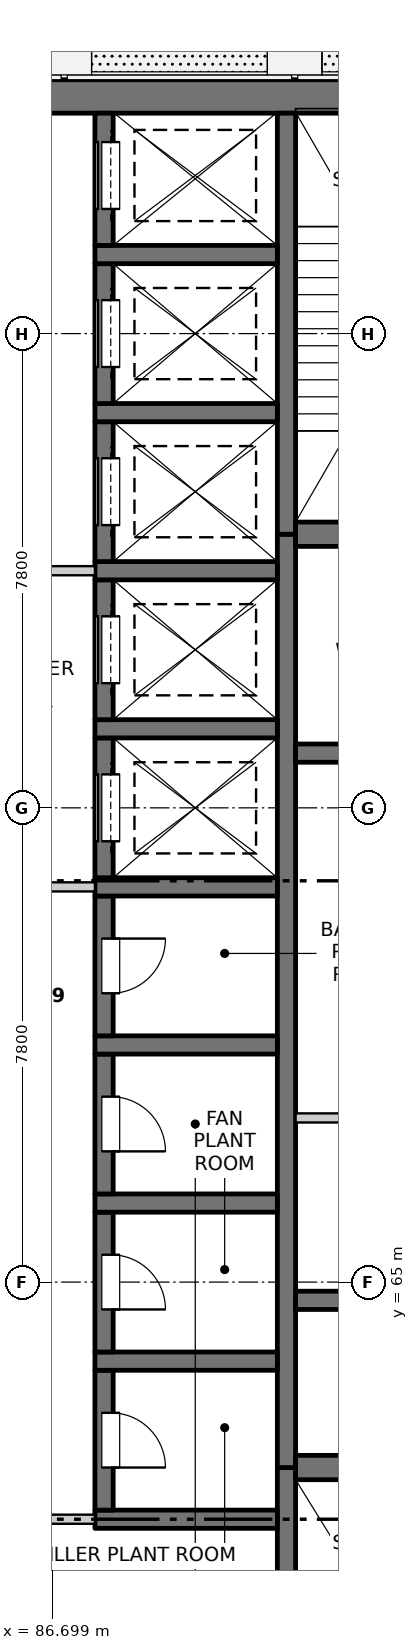
"""IFC4 building model, lengths in metres.
Left out: names, types, materials, properties, quantities, classifications, styles, units other than length and angle.
Written with IfcOpenShell. Run it as: python <this file> out.ifc"""

import sys

from ifc_helpers import new_model, si_unit, direction, frame, frame_2d, origin, place, context, subcontext, project, spatial, rectangle, extrude, element, fill, save


model = new_model("IFC4")
c1 = context("Model", 3, precision=1e-05, world=origin(), true_north=direction((0.0, 1.0)))
c2 = subcontext(c1, "Body", "Model", "MODEL_VIEW")
j1 = project(units=[si_unit("LENGTHUNIT", "METRE"), si_unit("PLANEANGLEUNIT", "RADIAN")], contexts=[c1])
p1 = place(None, origin())
s1 = spatial("IfcSite", under=j1, at=p1, CompositionType="ELEMENT")
p2 = place(p1, origin())
s2 = spatial("IfcBuilding", under=s1, at=p2, CompositionType="ELEMENT")
p3 = place(p2, frame((0.0, 0.0, 192.8)))
s3 = spatial("IfcBuildingStorey", under=s2, at=p3, CompositionType="ELEMENT", Elevation=192.8)
p4 = place(p3, frame((75.525, 84.5, -0.3), z_axis=(0.0, 0.0, 1.0), x_axis=(1.0, 0.0, 0.0)))
e1 = element("IfcWall", 1, at=p4, inside=s3, PredefinedType="SOLIDWALL", context=c2, shape_type="SweptSolid", body=[
    extrude(rectangle(XDim=18.95, YDim=0.55, at=frame_2d((9.475, 0.0))), origin(), (0.0, 0.0, 1.0), 4.5),
])
p5 = place(p3, frame((90.55, 55.525, -0.3), z_axis=(0.0, 0.0, 1.0), x_axis=(0.0, 1.0, 0.0)))
e2 = element("IfcWall", 2, at=p5, inside=s3, PredefinedType="SOLIDWALL", context=c2, shape_type="SweptSolid", body=[
    extrude(rectangle(XDim=6.425, YDim=0.3, at=frame_2d((3.212, 0.0))), origin(), (0.0, 0.0, 1.0), 4.5),
])
p6 = place(p5, frame((0.125, 0.0, 0.3)))
e3 = element("IfcOpeningElement", 3, at=p6, cuts=e2, PredefinedType="OPENING", context=c2, shape_type="SweptSolid", body=[
    extrude(rectangle(XDim=1.2, YDim=2.1, at=frame_2d((0.6, 1.05))), frame((0.0, 0.16, 0.0), z_axis=(0.0, -1.0, 0.0), x_axis=(1.0, 0.0, 0.0)), (0.0, 0.0, 1.0), 0.32),
])
p7 = place(p3, frame((90.55, 61.95, -0.3), z_axis=(0.0, 0.0, 1.0), x_axis=(0.0, 1.0, 0.0)))
e4 = element("IfcWall", 4, at=p7, inside=s3, PredefinedType="SOLIDWALL", context=c2, shape_type="SweptSolid", body=[
    extrude(rectangle(XDim=15.35, YDim=0.3, at=frame_2d((7.675, 0.0))), origin(), (0.0, 0.0, 1.0), 4.5),
])
p8 = place(p3, frame((90.55, 77.3, -0.3), z_axis=(0.0, 0.0, 1.0), x_axis=(0.0, 1.0, 0.0)))
e5 = element("IfcWall", 5, at=p8, inside=s3, PredefinedType="SOLIDWALL", context=c2, shape_type="SweptSolid", body=[
    extrude(rectangle(XDim=6.925, YDim=0.3, at=frame_2d((3.462, 0.0))), origin(), (0.0, 0.0, 1.0), 4.5),
])
p9 = place(p3, frame((87.4, 61.1, -0.3), z_axis=(0.0, 0.0, 1.0), x_axis=(1.0, 0.0, 0.0)))
e6 = element("IfcWall", 6, at=p9, inside=s3, PredefinedType="SOLIDWALL", context=c2, shape_type="SweptSolid", body=[
    extrude(rectangle(XDim=3.0, YDim=0.3, at=frame_2d((1.5, 0.0))), origin(), (0.0, 0.0, 1.0), 4.5),
])
p10 = place(p3, frame((87.55, 61.25, -0.3), z_axis=(0.0, 0.0, 1.0), x_axis=(0.0, 1.0, 0.0)))
e7 = element("IfcWall", 7, at=p10, inside=s3, PredefinedType="SOLIDWALL", context=c2, shape_type="SweptSolid", body=[
    extrude(rectangle(XDim=2.3, YDim=0.3, at=frame_2d((1.15, 0.0))), origin(), (0.0, 0.0, 1.0), 4.5),
])
p11 = place(p10, frame((0.7, 0.0, 0.3)))
e8 = element("IfcOpeningElement", 8, at=p11, cuts=e7, PredefinedType="OPENING", context=c2, shape_type="SweptSolid", body=[
    extrude(rectangle(XDim=0.9, YDim=2.1, at=frame_2d((0.45, 1.05))), frame((0.0, 0.16, 0.0), z_axis=(0.0, -1.0, 0.0), x_axis=(1.0, 0.0, 0.0)), (0.0, 0.0, 1.0), 0.32),
])
p12 = place(p3, frame((87.4, 63.7, -0.3), z_axis=(0.0, 0.0, 1.0), x_axis=(1.0, 0.0, 0.0)))
e9 = element("IfcWall", 9, at=p12, inside=s3, PredefinedType="SOLIDWALL", context=c2, shape_type="SweptSolid", body=[
    extrude(rectangle(XDim=3.0, YDim=0.3, at=frame_2d((1.5, 0.0))), origin(), (0.0, 0.0, 1.0), 4.5),
])
p13 = place(p3, frame((87.55, 63.85, -0.3), z_axis=(0.0, 0.0, 1.0), x_axis=(0.0, 1.0, 0.0)))
e10 = element("IfcWall", 10, at=p13, inside=s3, PredefinedType="SOLIDWALL", context=c2, shape_type="SweptSolid", body=[
    extrude(rectangle(XDim=2.3, YDim=0.3, at=frame_2d((1.15, 0.0))), origin(), (0.0, 0.0, 1.0), 4.5),
])
p14 = place(p13, frame((0.7, 0.0, 0.3)))
e11 = element("IfcOpeningElement", 11, at=p14, cuts=e10, PredefinedType="OPENING", context=c2, shape_type="SweptSolid", body=[
    extrude(rectangle(XDim=0.9, YDim=2.1, at=frame_2d((0.45, 1.05))), frame((0.0, 0.16, 0.0), z_axis=(0.0, -1.0, 0.0), x_axis=(1.0, 0.0, 0.0)), (0.0, 0.0, 1.0), 0.32),
])
p15 = place(p3, frame((87.4, 66.3, -0.3), z_axis=(0.0, 0.0, 1.0), x_axis=(1.0, 0.0, 0.0)))
e12 = element("IfcWall", 12, at=p15, inside=s3, PredefinedType="SOLIDWALL", context=c2, shape_type="SweptSolid", body=[
    extrude(rectangle(XDim=3.0, YDim=0.3, at=frame_2d((1.5, 0.0))), origin(), (0.0, 0.0, 1.0), 4.5),
])
p16 = place(p3, frame((87.55, 66.45, -0.3), z_axis=(0.0, 0.0, 1.0), x_axis=(0.0, 1.0, 0.0)))
e13 = element("IfcWall", 13, at=p16, inside=s3, PredefinedType="SOLIDWALL", context=c2, shape_type="SweptSolid", body=[
    extrude(rectangle(XDim=2.3, YDim=0.3, at=frame_2d((1.15, 0.0))), origin(), (0.0, 0.0, 1.0), 4.5),
])
p17 = place(p16, frame((0.7, 0.0, 0.3)))
e14 = element("IfcOpeningElement", 14, at=p17, cuts=e13, PredefinedType="OPENING", context=c2, shape_type="SweptSolid", body=[
    extrude(rectangle(XDim=0.9, YDim=2.1, at=frame_2d((0.45, 1.05))), frame((0.0, 0.16, 0.0), z_axis=(0.0, -1.0, 0.0), x_axis=(1.0, 0.0, 0.0)), (0.0, 0.0, 1.0), 0.32),
])
p18 = place(p3, frame((87.4, 68.9, -0.3), z_axis=(0.0, 0.0, 1.0), x_axis=(1.0, 0.0, 0.0)))
e15 = element("IfcWall", 15, at=p18, inside=s3, PredefinedType="SOLIDWALL", context=c2, shape_type="SweptSolid", body=[
    extrude(rectangle(XDim=3.0, YDim=0.3, at=frame_2d((1.5, 0.0))), origin(), (0.0, 0.0, 1.0), 4.5),
])
p19 = place(p3, frame((87.55, 69.05, -0.3), z_axis=(0.0, 0.0, 1.0), x_axis=(0.0, 1.0, 0.0)))
e16 = element("IfcWall", 16, at=p19, inside=s3, PredefinedType="SOLIDWALL", context=c2, shape_type="SweptSolid", body=[
    extrude(rectangle(XDim=2.3, YDim=0.3, at=frame_2d((1.15, 0.0))), origin(), (0.0, 0.0, 1.0), 4.5),
])
p20 = place(p19, frame((0.7, 0.0, 0.3)))
e17 = element("IfcOpeningElement", 17, at=p20, cuts=e16, PredefinedType="OPENING", context=c2, shape_type="SweptSolid", body=[
    extrude(rectangle(XDim=0.9, YDim=2.1, at=frame_2d((0.45, 1.05))), frame((0.0, 0.16, 0.0), z_axis=(0.0, -1.0, 0.0), x_axis=(1.0, 0.0, 0.0)), (0.0, 0.0, 1.0), 0.32),
])
p21 = place(p3, frame((87.4, 71.5, -0.3), z_axis=(0.0, 0.0, 1.0), x_axis=(1.0, 0.0, 0.0)))
e18 = element("IfcWall", 18, at=p21, inside=s3, PredefinedType="SOLIDWALL", context=c2, shape_type="SweptSolid", body=[
    extrude(rectangle(XDim=3.0, YDim=0.3, at=frame_2d((1.5, 0.0))), origin(), (0.0, 0.0, 1.0), 4.5),
])
p22 = place(p3, frame((87.55, 71.65, -0.3), z_axis=(0.0, 0.0, 1.0), x_axis=(0.0, 1.0, 0.0)))
e19 = element("IfcWall", 19, at=p22, inside=s3, PredefinedType="SOLIDWALL", context=c2, shape_type="SweptSolid", body=[
    extrude(rectangle(XDim=2.3, YDim=0.3, at=frame_2d((1.15, 0.0))), origin(), (0.0, 0.0, 1.0), 4.5),
])
p23 = place(p22, frame((0.6, 0.0, 0.3)))
e20 = element("IfcOpeningElement", 20, at=p23, cuts=e19, PredefinedType="OPENING", context=c2, shape_type="SweptSolid", body=[
    extrude(rectangle(XDim=1.1, YDim=2.1, at=frame_2d((0.55, 1.05))), frame((0.0, 0.16, 0.0), z_axis=(0.0, -1.0, 0.0), x_axis=(1.0, 0.0, 0.0)), (0.0, 0.0, 1.0), 0.32),
])
p24 = place(p3, frame((87.4, 74.1, -0.3), z_axis=(0.0, 0.0, 1.0), x_axis=(1.0, 0.0, 0.0)))
e21 = element("IfcWall", 21, at=p24, inside=s3, PredefinedType="SOLIDWALL", context=c2, shape_type="SweptSolid", body=[
    extrude(rectangle(XDim=3.0, YDim=0.3, at=frame_2d((1.5, 0.0))), origin(), (0.0, 0.0, 1.0), 4.5),
])
p25 = place(p3, frame((87.55, 74.25, -0.3), z_axis=(0.0, 0.0, 1.0), x_axis=(0.0, 1.0, 0.0)))
e22 = element("IfcWall", 22, at=p25, inside=s3, PredefinedType="SOLIDWALL", context=c2, shape_type="SweptSolid", body=[
    extrude(rectangle(XDim=2.3, YDim=0.3, at=frame_2d((1.15, 0.0))), origin(), (0.0, 0.0, 1.0), 4.5),
])
p26 = place(p25, frame((0.6, 0.0, 0.3)))
e23 = element("IfcOpeningElement", 23, at=p26, cuts=e22, PredefinedType="OPENING", context=c2, shape_type="SweptSolid", body=[
    extrude(rectangle(XDim=1.1, YDim=2.1, at=frame_2d((0.55, 1.05))), frame((0.0, 0.16, 0.0), z_axis=(0.0, -1.0, 0.0), x_axis=(1.0, 0.0, 0.0)), (0.0, 0.0, 1.0), 0.32),
])
p27 = place(p3, frame((87.4, 76.7, -0.3), z_axis=(0.0, 0.0, 1.0), x_axis=(1.0, 0.0, 0.0)))
e24 = element("IfcWall", 24, at=p27, inside=s3, PredefinedType="SOLIDWALL", context=c2, shape_type="SweptSolid", body=[
    extrude(rectangle(XDim=3.0, YDim=0.3, at=frame_2d((1.5, 0.0))), origin(), (0.0, 0.0, 1.0), 4.5),
])
p28 = place(p3, frame((87.55, 76.85, -0.3), z_axis=(0.0, 0.0, 1.0), x_axis=(0.0, 1.0, 0.0)))
e25 = element("IfcWall", 25, at=p28, inside=s3, PredefinedType="SOLIDWALL", context=c2, shape_type="SweptSolid", body=[
    extrude(rectangle(XDim=2.3, YDim=0.3, at=frame_2d((1.15, 0.0))), origin(), (0.0, 0.0, 1.0), 4.5),
])
p29 = place(p28, frame((0.6, 0.0, 0.3)))
e26 = element("IfcOpeningElement", 26, at=p29, cuts=e25, PredefinedType="OPENING", context=c2, shape_type="SweptSolid", body=[
    extrude(rectangle(XDim=1.1, YDim=2.1, at=frame_2d((0.55, 1.05))), frame((0.0, 0.16, 0.0), z_axis=(0.0, -1.0, 0.0), x_axis=(1.0, 0.0, 0.0)), (0.0, 0.0, 1.0), 0.32),
])
p30 = place(p3, frame((87.4, 79.3, -0.3), z_axis=(0.0, 0.0, 1.0), x_axis=(1.0, 0.0, 0.0)))
e27 = element("IfcWall", 27, at=p30, inside=s3, PredefinedType="SOLIDWALL", context=c2, shape_type="SweptSolid", body=[
    extrude(rectangle(XDim=3.0, YDim=0.3, at=frame_2d((1.5, 0.0))), origin(), (0.0, 0.0, 1.0), 4.5),
])
p31 = place(p3, frame((87.55, 79.45, -0.3), z_axis=(0.0, 0.0, 1.0), x_axis=(0.0, 1.0, 0.0)))
e28 = element("IfcWall", 28, at=p31, inside=s3, PredefinedType="SOLIDWALL", context=c2, shape_type="SweptSolid", body=[
    extrude(rectangle(XDim=2.3, YDim=0.3, at=frame_2d((1.15, 0.0))), origin(), (0.0, 0.0, 1.0), 4.5),
])
p32 = place(p31, frame((0.6, 0.0, 0.3)))
e29 = element("IfcOpeningElement", 29, at=p32, cuts=e28, PredefinedType="OPENING", context=c2, shape_type="SweptSolid", body=[
    extrude(rectangle(XDim=1.1, YDim=2.1, at=frame_2d((0.55, 1.05))), frame((0.0, 0.16, 0.0), z_axis=(0.0, -1.0, 0.0), x_axis=(1.0, 0.0, 0.0)), (0.0, 0.0, 1.0), 0.32),
])
p33 = place(p3, frame((87.4, 81.9, -0.3), z_axis=(0.0, 0.0, 1.0), x_axis=(1.0, 0.0, 0.0)))
e30 = element("IfcWall", 30, at=p33, inside=s3, PredefinedType="SOLIDWALL", context=c2, shape_type="SweptSolid", body=[
    extrude(rectangle(XDim=3.0, YDim=0.3, at=frame_2d((1.5, 0.0))), origin(), (0.0, 0.0, 1.0), 4.5),
])
p34 = place(p3, frame((87.55, 82.05, -0.3), z_axis=(0.0, 0.0, 1.0), x_axis=(0.0, 1.0, 0.0)))
e31 = element("IfcWall", 31, at=p34, inside=s3, PredefinedType="SOLIDWALL", context=c2, shape_type="SweptSolid", body=[
    extrude(rectangle(XDim=2.175, YDim=0.3, at=frame_2d((1.087, 0.0))), origin(), (0.0, 0.0, 1.0), 4.5),
])
p35 = place(p34, frame((0.6, 0.0, 0.3)))
e32 = element("IfcOpeningElement", 32, at=p35, cuts=e31, PredefinedType="OPENING", context=c2, shape_type="SweptSolid", body=[
    extrude(rectangle(XDim=1.1, YDim=2.1, at=frame_2d((0.55, 1.05))), frame((0.0, 0.16, 0.0), z_axis=(0.0, -1.0, 0.0), x_axis=(1.0, 0.0, 0.0)), (0.0, 0.0, 1.0), 0.32),
])
p36 = place(p3, frame((90.7, 61.95, -0.3), z_axis=(0.0, 0.0, 1.0), x_axis=(1.0, 0.0, 0.0)))
e33 = element("IfcWall", 33, at=p36, inside=s3, PredefinedType="SOLIDWALL", context=c2, shape_type="SweptSolid", body=[
    extrude(rectangle(XDim=3.775, YDim=0.4, at=frame_2d((1.888, 0.0))), origin(), (0.0, 0.0, 1.0), 4.5),
])
for number, where, z_axis, x_axis in (
    (34, (90.7, 64.7, -0.3), (0.0, 0.0, 1.0), (1.0, 0.0, 0.0)),
    (35, (90.7, 73.7, -0.3), (0.0, 0.0, 1.0), (1.0, 0.0, 0.0)),
):
    element("IfcWall", number, at=place(p3, frame(where, z_axis=z_axis, x_axis=x_axis)), inside=s3, PredefinedType="SOLIDWALL", context=c2, shape_type="SweptSolid", body=[
        extrude(rectangle(XDim=3.775, YDim=0.3, at=frame_2d((1.888, 0.0))), origin(), (0.0, 0.0, 1.0), 4.5),
    ])
p37 = place(p3, frame((90.7, 77.3, -0.3), z_axis=(0.0, 0.0, 1.0), x_axis=(1.0, 0.0, 0.0)))
e36 = element("IfcWall", 36, at=p37, inside=s3, PredefinedType="SOLIDWALL", context=c2, shape_type="SweptSolid", body=[
    extrude(rectangle(XDim=3.775, YDim=0.4, at=frame_2d((1.888, 0.0))), origin(), (0.0, 0.0, 1.0), 4.5),
])
p38 = place(p3, frame((82.6, 61.1, 0.0), z_axis=(0.0, 0.0, 1.0), x_axis=(1.0, 0.0, 0.0)))
e37 = element("IfcWall", 37, at=p38, inside=s3, PredefinedType="PARTITIONING", context=c2, shape_type="SweptSolid", body=[
    extrude(rectangle(XDim=4.8, YDim=0.15, at=frame_2d((2.4, 0.0))), origin(), (0.0, 0.0, 1.0), 4.2),
])
p39 = place(p38, frame((1.5, 0.0, 0.0)))
e38 = element("IfcOpeningElement", 38, at=p39, cuts=e37, PredefinedType="OPENING", context=c2, shape_type="SweptSolid", body=[
    extrude(rectangle(XDim=1.8, YDim=2.1, at=frame_2d((0.9, 1.05))), frame((0.0, 0.085, 0.0), z_axis=(0.0, -1.0, 0.0), x_axis=(1.0, 0.0, 0.0)), (0.0, 0.0, 1.0), 0.17),
])
p40 = place(p3, frame((90.7, 67.7, 0.0), z_axis=(0.0, 0.0, 1.0), x_axis=(1.0, 0.0, 0.0)))
e39 = element("IfcWall", 39, at=p40, inside=s3, PredefinedType="PARTITIONING", context=c2, shape_type="SweptSolid", body=[
    extrude(rectangle(XDim=3.775, YDim=0.15, at=frame_2d((1.887, 0.0))), origin(), (0.0, 0.0, 1.0), 4.2),
])
p41 = place(p3, frame((82.6, 71.5, 0.0), z_axis=(0.0, 0.0, 1.0), x_axis=(1.0, 0.0, 0.0)))
e40 = element("IfcWall", 40, at=p41, inside=s3, PredefinedType="PARTITIONING", context=c2, shape_type="SweptSolid", body=[
    extrude(rectangle(XDim=4.8, YDim=0.15, at=frame_2d((2.4, 0.0))), origin(), (0.0, 0.0, 1.0), 4.2),
])
p42 = place(p41, frame((1.5, 0.0, 0.0)))
e41 = element("IfcOpeningElement", 41, at=p42, cuts=e40, PredefinedType="OPENING", context=c2, shape_type="SweptSolid", body=[
    extrude(rectangle(XDim=1.8, YDim=2.1, at=frame_2d((0.9, 1.05))), frame((0.0, 0.085, 0.0), z_axis=(0.0, -1.0, 0.0), x_axis=(1.0, 0.0, 0.0)), (0.0, 0.0, 1.0), 0.17),
])
p43 = place(p3, frame((82.6, 76.7, 0.0), z_axis=(0.0, 0.0, 1.0), x_axis=(1.0, 0.0, 0.0)))
e42 = element("IfcWall", 42, at=p43, inside=s3, PredefinedType="PARTITIONING", context=c2, shape_type="SweptSolid", body=[
    extrude(rectangle(XDim=4.8, YDim=0.15, at=frame_2d((2.4, 0.0))), origin(), (0.0, 0.0, 1.0), 4.2),
])
p44 = place(p43, frame((1.5, 0.0, 0.0)))
e43 = element("IfcOpeningElement", 43, at=p44, cuts=e42, PredefinedType="OPENING", context=c2, shape_type="SweptSolid", body=[
    extrude(rectangle(XDim=1.8, YDim=2.1, at=frame_2d((0.9, 1.05))), frame((0.0, 0.085, 0.0), z_axis=(0.0, -1.0, 0.0), x_axis=(1.0, 0.0, 0.0)), (0.0, 0.0, 1.0), 0.17),
])
p45 = place(p11, origin())
e44 = element("IfcDoor", 44, at=p45, inside=s3, OperationType="SINGLE_SWING_RIGHT", PredefinedType="DOOR", context=c2, shape_type="SweptSolid", body=[
    extrude(rectangle(XDim=0.9, YDim=2.1, at=frame_2d((0.45, 1.05))), frame((0.0, -0.085, 0.0), z_axis=(0.0, -1.0, 0.0), x_axis=(1.0, 0.0, 0.0)), (0.0, 0.0, 1.0), 0.05),
])
fill(e8, e44)
p46 = place(p14, origin())
e45 = element("IfcDoor", 45, at=p46, inside=s3, OperationType="SINGLE_SWING_RIGHT", PredefinedType="DOOR", context=c2, shape_type="SweptSolid", body=[
    extrude(rectangle(XDim=0.9, YDim=2.1, at=frame_2d((0.45, 1.05))), frame((0.0, -0.085, 0.0), z_axis=(0.0, -1.0, 0.0), x_axis=(1.0, 0.0, 0.0)), (0.0, 0.0, 1.0), 0.05),
])
fill(e11, e45)
p47 = place(p17, origin())
e46 = element("IfcDoor", 46, at=p47, inside=s3, OperationType="SINGLE_SWING_RIGHT", PredefinedType="DOOR", context=c2, shape_type="SweptSolid", body=[
    extrude(rectangle(XDim=0.9, YDim=2.1, at=frame_2d((0.45, 1.05))), frame((0.0, -0.085, 0.0), z_axis=(0.0, -1.0, 0.0), x_axis=(1.0, 0.0, 0.0)), (0.0, 0.0, 1.0), 0.05),
])
fill(e14, e46)
p48 = place(p20, origin())
e47 = element("IfcDoor", 47, at=p48, inside=s3, OperationType="SINGLE_SWING_LEFT", PredefinedType="DOOR", context=c2, shape_type="SweptSolid", body=[
    extrude(rectangle(XDim=0.9, YDim=2.1, at=frame_2d((0.45, 1.05))), frame((0.0, -0.085, 0.0), z_axis=(0.0, -1.0, 0.0), x_axis=(1.0, 0.0, 0.0)), (0.0, 0.0, 1.0), 0.05),
])
fill(e17, e47)
p49 = place(p23, origin())
e48 = element("IfcDoor", 48, at=p49, inside=s3, OperationType="SLIDING_TO_LEFT", PredefinedType="DOOR", context=c2, shape_type="SweptSolid", body=[
    extrude(rectangle(XDim=1.1, YDim=2.1, at=frame_2d((0.55, 1.05))), frame((0.0, -0.085, 0.0), z_axis=(0.0, -1.0, 0.0), x_axis=(1.0, 0.0, 0.0)), (0.0, 0.0, 1.0), 0.05),
])
fill(e20, e48)
p50 = place(p26, origin())
e49 = element("IfcDoor", 49, at=p50, inside=s3, OperationType="SLIDING_TO_LEFT", PredefinedType="DOOR", context=c2, shape_type="SweptSolid", body=[
    extrude(rectangle(XDim=1.1, YDim=2.1, at=frame_2d((0.55, 1.05))), frame((0.0, -0.085, 0.0), z_axis=(0.0, -1.0, 0.0), x_axis=(1.0, 0.0, 0.0)), (0.0, 0.0, 1.0), 0.05),
])
fill(e23, e49)
p51 = place(p29, origin())
e50 = element("IfcDoor", 50, at=p51, inside=s3, OperationType="SLIDING_TO_LEFT", PredefinedType="DOOR", context=c2, shape_type="SweptSolid", body=[
    extrude(rectangle(XDim=1.1, YDim=2.1, at=frame_2d((0.55, 1.05))), frame((0.0, -0.085, 0.0), z_axis=(0.0, -1.0, 0.0), x_axis=(1.0, 0.0, 0.0)), (0.0, 0.0, 1.0), 0.05),
])
fill(e26, e50)
p52 = place(p32, origin())
e51 = element("IfcDoor", 51, at=p52, inside=s3, OperationType="SLIDING_TO_RIGHT", PredefinedType="DOOR", context=c2, shape_type="SweptSolid", body=[
    extrude(rectangle(XDim=1.1, YDim=2.1, at=frame_2d((0.55, 1.05))), frame((0.0, -0.085, 0.0), z_axis=(0.0, -1.0, 0.0), x_axis=(1.0, 0.0, 0.0)), (0.0, 0.0, 1.0), 0.05),
])
fill(e29, e51)
p53 = place(p35, origin())
e52 = element("IfcDoor", 52, at=p53, inside=s3, OperationType="SLIDING_TO_RIGHT", PredefinedType="DOOR", context=c2, shape_type="SweptSolid", body=[
    extrude(rectangle(XDim=1.1, YDim=2.1, at=frame_2d((0.55, 1.05))), frame((0.0, -0.085, 0.0), z_axis=(0.0, -1.0, 0.0), x_axis=(1.0, 0.0, 0.0)), (0.0, 0.0, 1.0), 0.05),
])
fill(e32, e52)
save(model, sys.argv[1])
